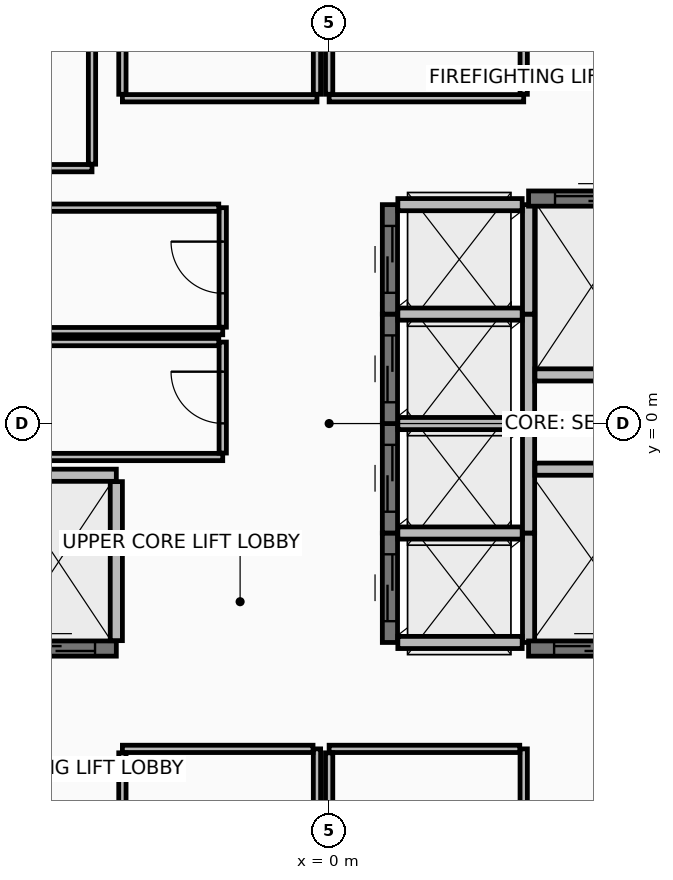
"""IFC4 building model, lengths in metres.
Left out: names, types, materials, properties, quantities, classifications, styles, units other than length and angle.
Written with IfcOpenShell. Run it as: python <this file> out.ifc"""

import sys

from ifc_helpers import new_model, si_unit, direction, frame, frame_2d, origin, place, context, subcontext, project, spatial, rectangle, extrude, element, fill, save


model = new_model("IFC4")
c1 = context("Model", 3, precision=1e-05, world=origin(), true_north=direction((0.0, 1.0)))
c2 = subcontext(c1, "Body", "Model", "MODEL_VIEW")
j1 = project(units=[si_unit("LENGTHUNIT", "METRE"), si_unit("PLANEANGLEUNIT", "RADIAN")], contexts=[c1])
p1 = place(None, origin())
s1 = spatial("IfcSite", under=j1, at=p1, CompositionType="ELEMENT")
p2 = place(p1, origin())
s2 = spatial("IfcBuilding", under=s1, at=p2, CompositionType="ELEMENT")
p3 = place(p2, frame((0.0, 0.0, 271.4)))
s3 = spatial("IfcBuildingStorey", under=s2, at=p3, CompositionType="ELEMENT", Elevation=271.4)
p4 = place(p3, frame((1.0, -3.6, 0.0), z_axis=(0.0, 0.0, 1.0), x_axis=(0.0, 1.0, 0.0)))
e1 = element("IfcWall", 1, at=p4, inside=s3, PredefinedType="SHEAR", context=c2, shape_type="SweptSolid", body=[
    extrude(rectangle(XDim=1.8, YDim=0.25, at=frame_2d((0.9, 0.0))), origin(), (0.0, 0.0, 1.0), 3.42),
])
p5 = place(p4, frame((0.35, 0.0, 0.0)))
e2 = element("IfcOpeningElement", 2, at=p5, cuts=e1, PredefinedType="OPENING", context=c2, shape_type="SweptSolid", body=[
    extrude(rectangle(XDim=1.1, YDim=2.2, at=frame_2d((0.55, 1.1))), frame((0.0, 0.135, 0.0), z_axis=(0.0, -1.0, 0.0), x_axis=(1.0, 0.0, 0.0)), (0.0, 0.0, 1.0), 0.27),
])
p6 = place(p3, frame((3.28, -3.6, 0.0), z_axis=(0.0, 0.0, 1.0), x_axis=(0.0, 1.0, 0.0)))
e3 = element("IfcWall", 3, at=p6, inside=s3, PredefinedType="PARTITIONING", context=c2, shape_type="SweptSolid", body=[
    extrude(rectangle(XDim=1.8, YDim=0.2, at=frame_2d((0.9, 0.0))), origin(), (0.0, 0.0, 1.0), 3.42),
])
for number, where, z_axis, x_axis in (
    (4, (1.13, -3.6, 0.0), (0.0, 0.0, 1.0), (1.0, 0.0, 0.0)),
    (5, (1.13, -1.8, 0.0), (0.0, 0.0, 1.0), (1.0, 0.0, 0.0)),
):
    element("IfcWall", number, at=place(p3, frame(where, z_axis=z_axis, x_axis=x_axis)), inside=s3, PredefinedType="PARTITIONING", context=c2, shape_type="SweptSolid", body=[
        extrude(rectangle(XDim=2.045, YDim=0.2, at=frame_2d((1.022, 0.0))), origin(), (0.0, 0.0, 1.0), 3.42),
    ])
p7 = place(p3, frame((1.0, -1.8, 0.0), z_axis=(0.0, 0.0, 1.0), x_axis=(0.0, 1.0, 0.0)))
e6 = element("IfcWall", 6, at=p7, inside=s3, PredefinedType="SHEAR", context=c2, shape_type="SweptSolid", body=[
    extrude(rectangle(XDim=1.8, YDim=0.25, at=frame_2d((0.9, 0.0))), origin(), (0.0, 0.0, 1.0), 3.42),
])
p8 = place(p7, frame((0.35, 0.0, 0.0)))
e7 = element("IfcOpeningElement", 7, at=p8, cuts=e6, PredefinedType="OPENING", context=c2, shape_type="SweptSolid", body=[
    extrude(rectangle(XDim=1.1, YDim=2.2, at=frame_2d((0.55, 1.1))), frame((0.0, 0.135, 0.0), z_axis=(0.0, -1.0, 0.0), x_axis=(1.0, 0.0, 0.0)), (0.0, 0.0, 1.0), 0.27),
])
p9 = place(p3, frame((3.28, -1.8, 0.0), z_axis=(0.0, 0.0, 1.0), x_axis=(0.0, 1.0, 0.0)))
e8 = element("IfcWall", 8, at=p9, inside=s3, PredefinedType="PARTITIONING", context=c2, shape_type="SweptSolid", body=[
    extrude(rectangle(XDim=1.8, YDim=0.2, at=frame_2d((0.9, 0.0))), origin(), (0.0, 0.0, 1.0), 3.42),
])
p10 = place(p3, frame((1.13, 0.0, 0.0), z_axis=(0.0, 0.0, 1.0), x_axis=(1.0, 0.0, 0.0)))
e9 = element("IfcWall", 9, at=p10, inside=s3, PredefinedType="PARTITIONING", context=c2, shape_type="SweptSolid", body=[
    extrude(rectangle(XDim=2.045, YDim=0.2, at=frame_2d((1.022, 0.0))), origin(), (0.0, 0.0, 1.0), 3.42),
])
p11 = place(p3, frame((1.0, 0.0, 0.0), z_axis=(0.0, 0.0, 1.0), x_axis=(0.0, 1.0, 0.0)))
e10 = element("IfcWall", 10, at=p11, inside=s3, PredefinedType="SHEAR", context=c2, shape_type="SweptSolid", body=[
    extrude(rectangle(XDim=1.8, YDim=0.25, at=frame_2d((0.9, 0.0))), origin(), (0.0, 0.0, 1.0), 3.42),
])
p12 = place(p11, frame((0.35, 0.0, 0.0)))
e11 = element("IfcOpeningElement", 11, at=p12, cuts=e10, PredefinedType="OPENING", context=c2, shape_type="SweptSolid", body=[
    extrude(rectangle(XDim=1.1, YDim=2.2, at=frame_2d((0.55, 1.1))), frame((0.0, 0.135, 0.0), z_axis=(0.0, -1.0, 0.0), x_axis=(1.0, 0.0, 0.0)), (0.0, 0.0, 1.0), 0.27),
])
p13 = place(p3, frame((3.28, 0.0, 0.0), z_axis=(0.0, 0.0, 1.0), x_axis=(0.0, 1.0, 0.0)))
e12 = element("IfcWall", 12, at=p13, inside=s3, PredefinedType="PARTITIONING", context=c2, shape_type="SweptSolid", body=[
    extrude(rectangle(XDim=1.8, YDim=0.2, at=frame_2d((0.9, 0.0))), origin(), (0.0, 0.0, 1.0), 3.42),
])
p14 = place(p3, frame((1.13, 1.8, 0.0), z_axis=(0.0, 0.0, 1.0), x_axis=(1.0, 0.0, 0.0)))
e13 = element("IfcWall", 13, at=p14, inside=s3, PredefinedType="PARTITIONING", context=c2, shape_type="SweptSolid", body=[
    extrude(rectangle(XDim=2.045, YDim=0.2, at=frame_2d((1.022, 0.0))), origin(), (0.0, 0.0, 1.0), 3.42),
])
p15 = place(p3, frame((1.0, 1.8, 0.0), z_axis=(0.0, 0.0, 1.0), x_axis=(0.0, 1.0, 0.0)))
e14 = element("IfcWall", 14, at=p15, inside=s3, PredefinedType="SHEAR", context=c2, shape_type="SweptSolid", body=[
    extrude(rectangle(XDim=1.8, YDim=0.25, at=frame_2d((0.9, 0.0))), origin(), (0.0, 0.0, 1.0), 3.42),
])
p16 = place(p15, frame((0.35, 0.0, 0.0)))
e15 = element("IfcOpeningElement", 15, at=p16, cuts=e14, PredefinedType="OPENING", context=c2, shape_type="SweptSolid", body=[
    extrude(rectangle(XDim=1.1, YDim=2.2, at=frame_2d((0.55, 1.1))), frame((0.0, 0.135, 0.0), z_axis=(0.0, -1.0, 0.0), x_axis=(1.0, 0.0, 0.0)), (0.0, 0.0, 1.0), 0.27),
])
p17 = place(p3, frame((3.28, 1.8, 0.0), z_axis=(0.0, 0.0, 1.0), x_axis=(0.0, 1.0, 0.0)))
e16 = element("IfcWall", 16, at=p17, inside=s3, PredefinedType="PARTITIONING", context=c2, shape_type="SweptSolid", body=[
    extrude(rectangle(XDim=1.8, YDim=0.2, at=frame_2d((0.9, 0.0))), origin(), (0.0, 0.0, 1.0), 3.42),
])
p18 = place(p3, frame((1.13, 3.6, 0.0), z_axis=(0.0, 0.0, 1.0), x_axis=(1.0, 0.0, 0.0)))
e17 = element("IfcWall", 17, at=p18, inside=s3, PredefinedType="PARTITIONING", context=c2, shape_type="SweptSolid", body=[
    extrude(rectangle(XDim=2.045, YDim=0.2, at=frame_2d((1.022, 0.0))), origin(), (0.0, 0.0, 1.0), 2.715),
])
p19 = place(p3, frame((-5.4, -3.7, 0.0), z_axis=(0.0, 0.0, 1.0), x_axis=(1.0, 0.0, 0.0)))
e18 = element("IfcWall", 18, at=p19, inside=s3, PredefinedType="SHEAR", context=c2, shape_type="SweptSolid", body=[
    extrude(rectangle(XDim=1.9, YDim=0.25, at=frame_2d((0.95, 0.0))), origin(), (0.0, 0.0, 1.0), 3.42),
])
p20 = place(p19, frame((0.35, 0.0, 0.0)))
e19 = element("IfcOpeningElement", 19, at=p20, cuts=e18, PredefinedType="OPENING", context=c2, shape_type="SweptSolid", body=[
    extrude(rectangle(XDim=1.2, YDim=2.2, at=frame_2d((0.6, 1.1))), frame((0.0, 0.135, 0.0), z_axis=(0.0, -1.0, 0.0), x_axis=(1.0, 0.0, 0.0)), (0.0, 0.0, 1.0), 0.27),
])
p21 = place(p3, frame((-5.27, -0.85, 0.0), z_axis=(0.0, 0.0, 1.0), x_axis=(1.0, 0.0, 0.0)))
e20 = element("IfcWall", 20, at=p21, inside=s3, PredefinedType="PARTITIONING", context=c2, shape_type="SweptSolid", body=[
    extrude(rectangle(XDim=1.77, YDim=0.2, at=frame_2d((0.885, 0.0))), origin(), (0.0, 0.0, 1.0), 3.42),
])
p22 = place(p3, frame((-3.5, -3.57, 0.0), z_axis=(0.0, 0.0, 1.0), x_axis=(0.0, 1.0, 0.0)))
e21 = element("IfcWall", 21, at=p22, inside=s3, PredefinedType="PARTITIONING", context=c2, shape_type="SweptSolid", body=[
    extrude(rectangle(XDim=2.615, YDim=0.2, at=frame_2d((1.308, 0.0))), origin(), (0.0, 0.0, 1.0), 3.42),
])
p23 = place(p3, frame((3.28, 3.7, 0.0), z_axis=(0.0, 0.0, 1.0), x_axis=(1.0, 0.0, 0.0)))
e22 = element("IfcWall", 22, at=p23, inside=s3, PredefinedType="SHEAR", context=c2, shape_type="SweptSolid", body=[
    extrude(rectangle(XDim=2.07, YDim=0.25, at=frame_2d((1.035, 0.0))), origin(), (0.0, 0.0, 1.0), 3.42),
])
p24 = place(p23, frame((0.435, 0.0, 0.0)))
e23 = element("IfcOpeningElement", 23, at=p24, cuts=e22, PredefinedType="OPENING", context=c2, shape_type="SweptSolid", body=[
    extrude(rectangle(XDim=1.2, YDim=2.2, at=frame_2d((0.6, 1.1))), frame((0.0, 0.135, 0.0), z_axis=(0.0, -1.0, 0.0), x_axis=(1.0, 0.0, 0.0)), (0.0, 0.0, 1.0), 0.27),
])
p25 = place(p3, frame((3.385, 0.8, 0.0), z_axis=(0.0, 0.0, 1.0), x_axis=(1.0, 0.0, 0.0)))
e24 = element("IfcWall", 24, at=p25, inside=s3, PredefinedType="PARTITIONING", context=c2, shape_type="SweptSolid", body=[
    extrude(rectangle(XDim=1.835, YDim=0.2, at=frame_2d((0.917, 0.0))), origin(), (0.0, 0.0, 1.0), 3.42),
])
p26 = place(p3, frame((3.28, -3.7, 0.0), z_axis=(0.0, 0.0, 1.0), x_axis=(1.0, 0.0, 0.0)))
e25 = element("IfcWall", 25, at=p26, inside=s3, PredefinedType="SHEAR", context=c2, shape_type="SweptSolid", body=[
    extrude(rectangle(XDim=1.94, YDim=0.25, at=frame_2d((0.97, 0.0))), origin(), (0.0, 0.0, 1.0), 3.42),
])
p27 = place(p26, frame((0.42, 0.0, 0.0)))
e26 = element("IfcOpeningElement", 26, at=p27, cuts=e25, PredefinedType="OPENING", context=c2, shape_type="SweptSolid", body=[
    extrude(rectangle(XDim=1.1, YDim=2.2, at=frame_2d((0.55, 1.1))), frame((0.0, 0.135, 0.0), z_axis=(0.0, -1.0, 0.0), x_axis=(1.0, 0.0, 0.0)), (0.0, 0.0, 1.0), 0.27),
])
p28 = place(p3, frame((3.385, -0.75, 0.0), z_axis=(0.0, 0.0, 1.0), x_axis=(1.0, 0.0, 0.0)))
e27 = element("IfcWall", 27, at=p28, inside=s3, PredefinedType="PARTITIONING", context=c2, shape_type="SweptSolid", body=[
    extrude(rectangle(XDim=1.835, YDim=0.2, at=frame_2d((0.917, 0.0))), origin(), (0.0, 0.0, 1.0), 3.42),
])
p29 = place(p3, frame((-5.22, 1.52, 0.0), z_axis=(0.0, 0.0, 1.0), x_axis=(1.0, 0.0, 0.0)))
e28 = element("IfcWall", 28, at=p29, inside=s3, PredefinedType="PARTITIONING", context=c2, shape_type="SweptSolid", body=[
    extrude(rectangle(XDim=3.47, YDim=0.12, at=frame_2d((1.735, 0.0))), origin(), (0.0, 0.0, 1.0), 3.42),
])
p30 = place(p3, frame((-1.75, 1.585, 0.0), z_axis=(0.0, 0.0, 1.0), x_axis=(0.0, 1.0, 0.0)))
e29 = element("IfcWall", 29, at=p30, inside=s3, PredefinedType="PARTITIONING", context=c2, shape_type="SweptSolid", body=[
    extrude(rectangle(XDim=1.965, YDim=0.12, at=frame_2d((0.982, 0.0))), origin(), (0.0, 0.0, 1.0), 3.42),
])
p31 = place(p30, frame((0.557, 0.0, 0.0)))
e30 = element("IfcOpeningElement", 30, at=p31, cuts=e29, PredefinedType="OPENING", context=c2, shape_type="SweptSolid", body=[
    extrude(rectangle(XDim=0.85, YDim=2.1, at=frame_2d((0.425, 1.05))), frame((0.0, 0.07, 0.0), z_axis=(0.0, -1.0, 0.0), x_axis=(1.0, 0.0, 0.0)), (0.0, 0.0, 1.0), 0.14),
])
p32 = place(p3, frame((-1.815, 3.55, 0.0), z_axis=(0.0, 0.0, 1.0), x_axis=(-1.0, 0.0, 0.0)))
e31 = element("IfcWall", 31, at=p32, inside=s3, PredefinedType="PARTITIONING", context=c2, shape_type="SweptSolid", body=[
    extrude(rectangle(XDim=3.405, YDim=0.12, at=frame_2d((1.703, 0.0))), origin(), (0.0, 0.0, 1.0), 3.42),
])
p33 = place(p3, frame((-5.22, -0.55, 0.0), z_axis=(0.0, 0.0, 1.0), x_axis=(1.0, 0.0, 0.0)))
e32 = element("IfcWall", 32, at=p33, inside=s3, PredefinedType="PARTITIONING", context=c2, shape_type="SweptSolid", body=[
    extrude(rectangle(XDim=3.47, YDim=0.12, at=frame_2d((1.735, 0.0))), origin(), (0.0, 0.0, 1.0), 3.42),
])
p34 = place(p3, frame((-1.75, -0.485, 0.0), z_axis=(0.0, 0.0, 1.0), x_axis=(0.0, 1.0, 0.0)))
e33 = element("IfcWall", 33, at=p34, inside=s3, PredefinedType="PARTITIONING", context=c2, shape_type="SweptSolid", body=[
    extrude(rectangle(XDim=1.825, YDim=0.12, at=frame_2d((0.913, 0.0))), origin(), (0.0, 0.0, 1.0), 3.42),
])
p35 = place(p34, frame((0.488, 0.0, 0.0)))
e34 = element("IfcOpeningElement", 34, at=p35, cuts=e33, PredefinedType="OPENING", context=c2, shape_type="SweptSolid", body=[
    extrude(rectangle(XDim=0.85, YDim=2.1, at=frame_2d((0.425, 1.05))), frame((0.0, 0.07, 0.0), z_axis=(0.0, -1.0, 0.0), x_axis=(1.0, 0.0, 0.0)), (0.0, 0.0, 1.0), 0.14),
])
p36 = place(p3, frame((-1.815, 1.34, 0.0), z_axis=(0.0, 0.0, 1.0), x_axis=(-1.0, 0.0, 0.0)))
e35 = element("IfcWall", 35, at=p36, inside=s3, PredefinedType="PARTITIONING", context=c2, shape_type="SweptSolid", body=[
    extrude(rectangle(XDim=3.405, YDim=0.12, at=frame_2d((1.703, 0.0))), origin(), (0.0, 0.0, 1.0), 3.42),
])
p37 = place(p3, frame((-0.2, -7.42, 0.0), z_axis=(0.0, 0.0, 1.0), x_axis=(0.0, 1.0, 0.0)))
e36 = element("IfcWall", 36, at=p37, inside=s3, PredefinedType="PARTITIONING", context=c2, shape_type="SweptSolid", body=[
    extrude(rectangle(XDim=2.07, YDim=0.12, at=frame_2d((1.035, 0.0))), origin(), (0.0, 0.0, 1.0), 2.715),
])
p38 = place(p3, frame((-0.265, -5.35, 0.0), z_axis=(0.0, 0.0, 1.0), x_axis=(-1.0, 0.0, 0.0)))
e37 = element("IfcWall", 37, at=p38, inside=s3, PredefinedType="PARTITIONING", context=c2, shape_type="SweptSolid", body=[
    extrude(rectangle(XDim=3.135, YDim=0.12, at=frame_2d((1.567, 0.0))), origin(), (0.0, 0.0, 1.0), 2.715),
])
p39 = place(p3, frame((-3.4, -5.415, 0.0), z_axis=(0.0, 0.0, 1.0), x_axis=(0.0, -1.0, 0.0)))
e38 = element("IfcWall", 38, at=p39, inside=s3, PredefinedType="PARTITIONING", context=c2, shape_type="SweptSolid", body=[
    extrude(rectangle(XDim=2.8, YDim=0.12, at=frame_2d((1.4, 0.0))), origin(), (0.0, 0.0, 1.0), 2.715),
])
p40 = place(p3, frame((3.2, -8.215, 0.0), z_axis=(0.0, 0.0, 1.0), x_axis=(0.0, 1.0, 0.0)))
e39 = element("IfcWall", 39, at=p40, inside=s3, PredefinedType="PARTITIONING", context=c2, shape_type="SweptSolid", body=[
    extrude(rectangle(XDim=2.865, YDim=0.12, at=frame_2d((1.433, 0.0))), origin(), (0.0, 0.0, 1.0), 2.715),
])
p41 = place(p3, frame((3.135, -5.35, 0.0), z_axis=(0.0, 0.0, 1.0), x_axis=(-1.0, 0.0, 0.0)))
e40 = element("IfcWall", 40, at=p41, inside=s3, PredefinedType="PARTITIONING", context=c2, shape_type="SweptSolid", body=[
    extrude(rectangle(XDim=3.135, YDim=0.12, at=frame_2d((1.567, 0.0))), origin(), (0.0, 0.0, 1.0), 3.42),
])
p42 = place(p3, frame((0.0, -5.415, 0.0), z_axis=(0.0, 0.0, 1.0), x_axis=(0.0, -1.0, 0.0)))
e41 = element("IfcWall", 41, at=p42, inside=s3, PredefinedType="PARTITIONING", context=c2, shape_type="SweptSolid", body=[
    extrude(rectangle(XDim=2.005, YDim=0.12, at=frame_2d((1.002, 0.0))), origin(), (0.0, 0.0, 1.0), 2.715),
])
p43 = place(p3, frame((-3.4, 5.35, 0.0), z_axis=(0.0, 0.0, 1.0), x_axis=(1.0, 0.0, 0.0)))
e42 = element("IfcWall", 42, at=p43, inside=s3, PredefinedType="PARTITIONING", context=c2, shape_type="SweptSolid", body=[
    extrude(rectangle(XDim=3.2, YDim=0.12, at=frame_2d((1.6, 0.0))), origin(), (0.0, 0.0, 1.0), 3.42),
])
p44 = place(p3, frame((-0.2, 5.415, 0.0), z_axis=(0.0, 0.0, 1.0), x_axis=(0.0, 1.0, 0.0)))
e43 = element("IfcWall", 43, at=p44, inside=s3, PredefinedType="PARTITIONING", context=c2, shape_type="SweptSolid", body=[
    extrude(rectangle(XDim=2.005, YDim=0.12, at=frame_2d((1.002, 0.0))), origin(), (0.0, 0.0, 1.0), 2.715),
])
p45 = place(p3, frame((-3.4, 8.215, 0.0), z_axis=(0.0, 0.0, 1.0), x_axis=(0.0, -1.0, 0.0)))
e44 = element("IfcWall", 44, at=p45, inside=s3, PredefinedType="PARTITIONING", context=c2, shape_type="SweptSolid", body=[
    extrude(rectangle(XDim=2.8, YDim=0.12, at=frame_2d((1.4, 0.0))), origin(), (0.0, 0.0, 1.0), 2.715),
])
p46 = place(p3, frame((0.0, 5.35, 0.0), z_axis=(0.0, 0.0, 1.0), x_axis=(1.0, 0.0, 0.0)))
e45 = element("IfcWall", 45, at=p46, inside=s3, PredefinedType="PARTITIONING", context=c2, shape_type="SweptSolid", body=[
    extrude(rectangle(XDim=3.2, YDim=0.12, at=frame_2d((1.6, 0.0))), origin(), (0.0, 0.0, 1.0), 2.715),
])
p47 = place(p3, frame((3.2, 5.415, 0.0), z_axis=(0.0, 0.0, 1.0), x_axis=(0.0, 1.0, 0.0)))
e46 = element("IfcWall", 46, at=p47, inside=s3, PredefinedType="PARTITIONING", context=c2, shape_type="SweptSolid", body=[
    extrude(rectangle(XDim=2.8, YDim=0.12, at=frame_2d((1.4, 0.0))), origin(), (0.0, 0.0, 1.0), 2.715),
])
p48 = place(p3, frame((0.0, 7.42, 0.0), z_axis=(0.0, 0.0, 1.0), x_axis=(0.0, -1.0, 0.0)))
e47 = element("IfcWall", 47, at=p48, inside=s3, PredefinedType="PARTITIONING", context=c2, shape_type="SweptSolid", body=[
    extrude(rectangle(XDim=2.005, YDim=0.12, at=frame_2d((1.002, 0.0))), origin(), (0.0, 0.0, 1.0), 2.715),
])
p49 = place(p3, frame((-7.8, 4.2, 0.0), z_axis=(0.0, 0.0, 1.0), x_axis=(1.0, 0.0, 0.0)))
e48 = element("IfcWall", 48, at=p49, inside=s3, PredefinedType="PARTITIONING", context=c2, shape_type="SweptSolid", body=[
    extrude(rectangle(XDim=3.9, YDim=0.12, at=frame_2d((1.95, 0.0))), origin(), (0.0, 0.0, 1.0), 3.42),
])
p50 = place(p3, frame((-3.9, 4.265, 0.0), z_axis=(0.0, 0.0, 1.0), x_axis=(0.0, 1.0, 0.0)))
e49 = element("IfcWall", 49, at=p50, inside=s3, PredefinedType="PARTITIONING", context=c2, shape_type="SweptSolid", body=[
    extrude(rectangle(XDim=3.95, YDim=0.12, at=frame_2d((1.975, 0.0))), origin(), (0.0, 0.0, 1.0), 2.715),
])
p51 = place(p5, origin())
e50 = element("IfcDoor", 50, at=p51, inside=s3, OperationType="SLIDING_TO_LEFT", PredefinedType="DOOR", context=c2, shape_type="SweptSolid", body=[
    extrude(rectangle(XDim=1.1, YDim=2.2, at=frame_2d((0.55, 1.1))), frame((0.0, 0.025, 0.0), z_axis=(0.0, -1.0, 0.0), x_axis=(1.0, 0.0, 0.0)), (0.0, 0.0, 1.0), 0.05),
])
fill(e2, e50)
p52 = place(p8, origin())
e51 = element("IfcDoor", 51, at=p52, inside=s3, OperationType="SLIDING_TO_LEFT", PredefinedType="DOOR", context=c2, shape_type="SweptSolid", body=[
    extrude(rectangle(XDim=1.1, YDim=2.2, at=frame_2d((0.55, 1.1))), frame((0.0, 0.025, 0.0), z_axis=(0.0, -1.0, 0.0), x_axis=(1.0, 0.0, 0.0)), (0.0, 0.0, 1.0), 0.05),
])
fill(e7, e51)
p53 = place(p12, origin())
e52 = element("IfcDoor", 52, at=p53, inside=s3, OperationType="SLIDING_TO_LEFT", PredefinedType="DOOR", context=c2, shape_type="SweptSolid", body=[
    extrude(rectangle(XDim=1.1, YDim=2.2, at=frame_2d((0.55, 1.1))), frame((0.0, 0.025, 0.0), z_axis=(0.0, -1.0, 0.0), x_axis=(1.0, 0.0, 0.0)), (0.0, 0.0, 1.0), 0.05),
])
fill(e11, e52)
p54 = place(p16, origin())
e53 = element("IfcDoor", 53, at=p54, inside=s3, OperationType="SLIDING_TO_LEFT", PredefinedType="DOOR", context=c2, shape_type="SweptSolid", body=[
    extrude(rectangle(XDim=1.1, YDim=2.2, at=frame_2d((0.55, 1.1))), frame((0.0, 0.025, 0.0), z_axis=(0.0, -1.0, 0.0), x_axis=(1.0, 0.0, 0.0)), (0.0, 0.0, 1.0), 0.05),
])
fill(e15, e53)
p55 = place(p20, origin())
e54 = element("IfcDoor", 54, at=p55, inside=s3, OperationType="SLIDING_TO_RIGHT", PredefinedType="DOOR", context=c2, shape_type="SweptSolid", body=[
    extrude(rectangle(XDim=1.2, YDim=2.2, at=frame_2d((0.6, 1.1))), frame((0.0, 0.025, 0.0), z_axis=(0.0, -1.0, 0.0), x_axis=(1.0, 0.0, 0.0)), (0.0, 0.0, 1.0), 0.05),
])
fill(e19, e54)
p56 = place(p24, origin())
e55 = element("IfcDoor", 55, at=p56, inside=s3, OperationType="SLIDING_TO_RIGHT", PredefinedType="DOOR", context=c2, shape_type="SweptSolid", body=[
    extrude(rectangle(XDim=1.2, YDim=2.2, at=frame_2d((0.6, 1.1))), frame((0.0, 0.025, 0.0), z_axis=(0.0, -1.0, 0.0), x_axis=(1.0, 0.0, 0.0)), (0.0, 0.0, 1.0), 0.05),
])
fill(e23, e55)
p57 = place(p27, origin())
e56 = element("IfcDoor", 56, at=p57, inside=s3, OperationType="SLIDING_TO_LEFT", PredefinedType="DOOR", context=c2, shape_type="SweptSolid", body=[
    extrude(rectangle(XDim=1.1, YDim=2.2, at=frame_2d((0.55, 1.1))), frame((0.0, 0.025, 0.0), z_axis=(0.0, -1.0, 0.0), x_axis=(1.0, 0.0, 0.0)), (0.0, 0.0, 1.0), 0.05),
])
fill(e26, e56)
p58 = place(p31, frame((0.85, 0.0, 0.0), z_axis=(0.0, 0.0, 1.0), x_axis=(-1.0, 0.0, 0.0)))
e57 = element("IfcDoor", 57, at=p58, inside=s3, OperationType="SINGLE_SWING_RIGHT", PredefinedType="DOOR", context=c2, shape_type="SweptSolid", body=[
    extrude(rectangle(XDim=0.85, YDim=2.1, at=frame_2d((0.425, 1.05))), frame((0.0, 0.025, 0.0), z_axis=(0.0, -1.0, 0.0), x_axis=(1.0, 0.0, 0.0)), (0.0, 0.0, 1.0), 0.05),
])
fill(e30, e57)
p59 = place(p35, frame((0.85, 0.0, 0.0), z_axis=(0.0, 0.0, 1.0), x_axis=(-1.0, 0.0, 0.0)))
e58 = element("IfcDoor", 58, at=p59, inside=s3, OperationType="SINGLE_SWING_RIGHT", PredefinedType="DOOR", context=c2, shape_type="SweptSolid", body=[
    extrude(rectangle(XDim=0.85, YDim=2.1, at=frame_2d((0.425, 1.05))), frame((0.0, 0.025, 0.0), z_axis=(0.0, -1.0, 0.0), x_axis=(1.0, 0.0, 0.0)), (0.0, 0.0, 1.0), 0.05),
])
fill(e34, e58)
save(model, sys.argv[1])
